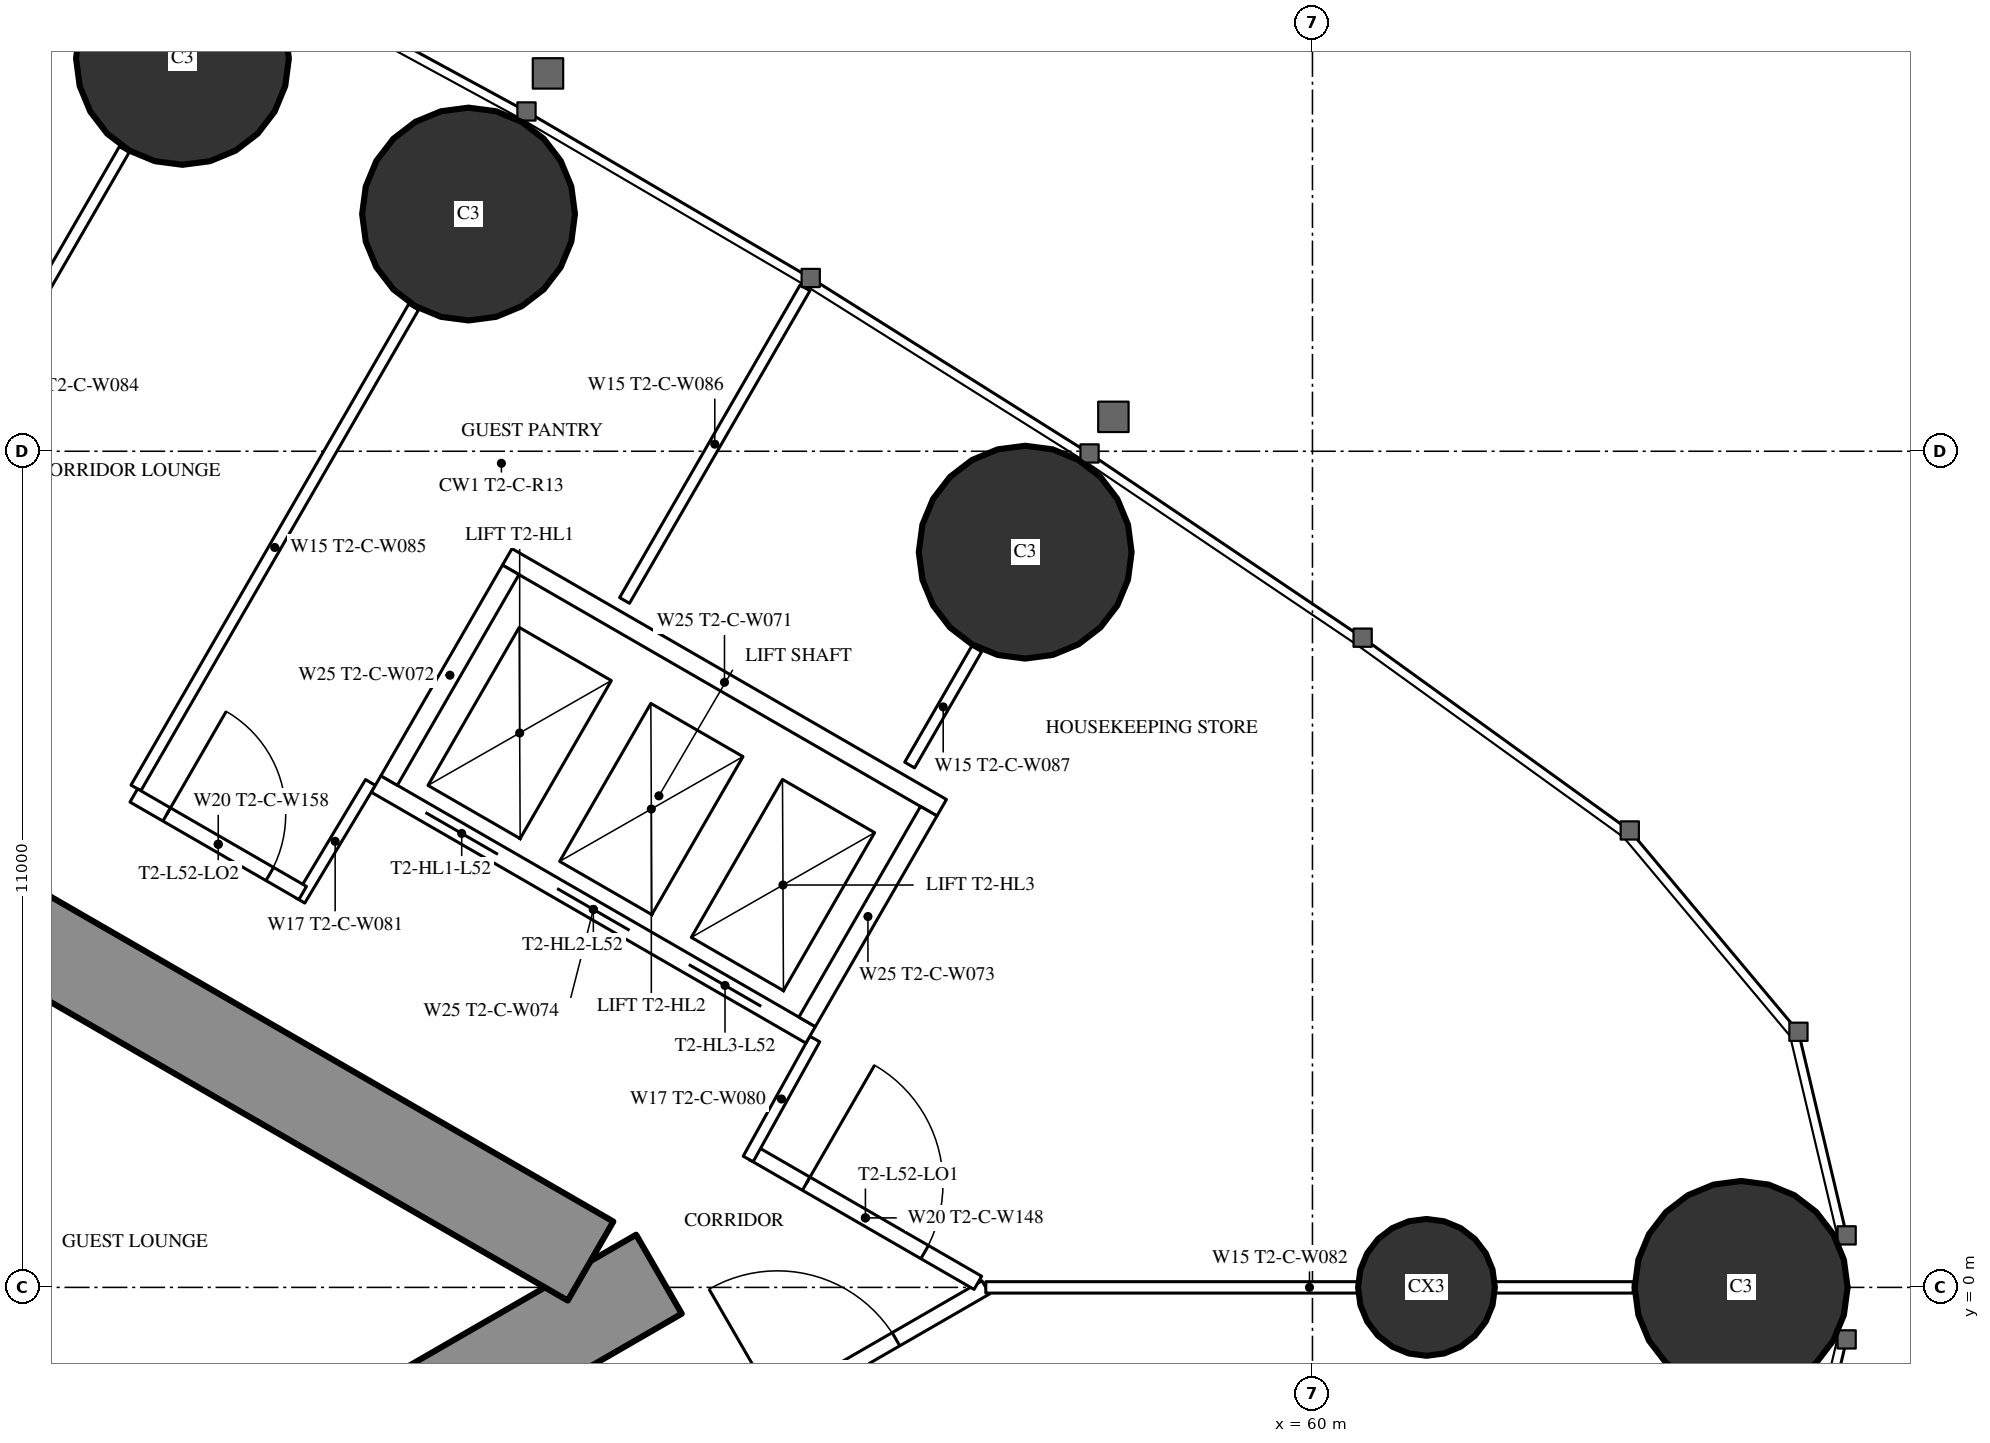
"""IFC4 building model, lengths in metres.
Left out: names, types, materials, properties, quantities, classifications, styles, units other than length and angle.
Written with IfcOpenShell. Run it as: python <this file> out.ifc"""

import sys

from ifc_helpers import new_model, si_unit, direction, frame, frame_2d, origin, origin_2d, place, context, subcontext, project, spatial, rectangle, circle, extrude, element, fill, save


model = new_model("IFC4")
c1 = context("Model", 3, precision=1e-05, world=origin(), true_north=direction((0.0, 1.0)))
c2 = subcontext(c1, "Body", "Model", "MODEL_VIEW")
j1 = project(units=[si_unit("LENGTHUNIT", "METRE"), si_unit("PLANEANGLEUNIT", "RADIAN")], contexts=[c1])
p1 = place(None, origin())
s1 = spatial("IfcSite", under=j1, at=p1, CompositionType="ELEMENT")
p2 = place(p1, origin())
s2 = spatial("IfcBuilding", under=s1, at=p2, CompositionType="ELEMENT")
p3 = place(p2, frame((0.0, 0.0, 194.8)))
s3 = spatial("IfcBuildingStorey", under=s2, at=p3, CompositionType="ELEMENT", Elevation=194.8)
for number, where, z_axis, x_axis in (
    (1, (65.64, 0.0, 0.0), (0.0, 0.0, 1.0), (1.0, 0.0, 0.0)),
    (2, (56.221, 9.672, 0.0), (0.0, 0.0, 1.0), (1.0, 0.0, 0.0)),
    (3, (48.897, 14.121, 0.0), (0.0, 0.0, 1.0), (1.0, 0.0, 0.0)),
    (4, (45.134, 16.168, 0.0), (0.0, 0.0, 1.0), (1.0, 0.0, 0.0)),
):
    element("IfcColumn", number, at=place(p3, frame(where, z_axis=z_axis, x_axis=x_axis)), inside=s3, PredefinedType="COLUMN", context=c2, shape_type="SweptSolid", body=[
        extrude(circle(Radius=1.4, at=origin_2d()), origin(), (0.0, 0.0, 1.0), 3.5),
    ])
p4 = place(p3, frame((61.5, 0.0, 0.0), z_axis=(0.0, 0.0, 1.0), x_axis=(1.0, 0.0, 0.0)))
e5 = element("IfcColumn", 5, at=p4, inside=s3, PredefinedType="COLUMN", context=c2, shape_type="SweptSolid", body=[
    extrude(circle(Radius=0.9, at=origin_2d()), origin(), (0.0, 0.0, 1.0), 3.5),
])
p5 = place(p3, frame((27.2, -13.8, 0.0), z_axis=(0.0, 0.0, 1.0), x_axis=(0.866027159892, 0.499996958321, 0.0)))
e6 = element("IfcWall", 6, at=p5, inside=s3, PredefinedType="SHEAR", context=c2, shape_type="SweptSolid", body=[
    extrude(rectangle(XDim=27.947, YDim=1.2, at=frame_2d((13.973, 0.0))), origin(), (0.0, 0.0, 1.0), 3.5),
])
p6 = place(p5, frame((4.6, 0.0, 0.0)))
e7 = element("IfcOpeningElement", 7, at=p6, cuts=e6, PredefinedType="OPENING", context=c2, shape_type="SweptSolid", body=[
    extrude(rectangle(XDim=1.0, YDim=2.2, at=frame_2d((0.5, 1.1))), frame((0.0, 0.61, 0.0), z_axis=(0.0, -1.0, 0.0), x_axis=(1.0, 0.0, 0.0)), (0.0, 0.0, 1.0), 1.22),
])
p7 = place(p5, frame((13.395, 0.0, 0.0)))
e8 = element("IfcOpeningElement", 8, at=p7, cuts=e6, PredefinedType="OPENING", context=c2, shape_type="SweptSolid", body=[
    extrude(rectangle(XDim=1.8, YDim=2.2, at=frame_2d((0.9, 1.1))), frame((0.0, 0.61, 0.0), z_axis=(0.0, -1.0, 0.0), x_axis=(1.0, 0.0, 0.0)), (0.0, 0.0, 1.0), 1.22),
])
p8 = place(p3, frame((27.2, 13.8, 0.0), z_axis=(0.0, 0.0, 1.0), x_axis=(0.866024515034, -0.500001539357, 0.0)))
e9 = element("IfcWall", 9, at=p8, inside=s3, PredefinedType="SHEAR", context=c2, shape_type="SweptSolid", body=[
    extrude(rectangle(XDim=26.907, YDim=1.2, at=frame_2d((13.454, 0.0))), origin(), (0.0, 0.0, 1.0), 3.5),
])
p9 = place(p8, frame((4.6, 0.0, 0.0)))
e10 = element("IfcOpeningElement", 10, at=p9, cuts=e9, PredefinedType="OPENING", context=c2, shape_type="SweptSolid", body=[
    extrude(rectangle(XDim=1.0, YDim=2.2, at=frame_2d((0.5, 1.1))), frame((0.0, 0.61, 0.0), z_axis=(0.0, -1.0, 0.0), x_axis=(1.0, 0.0, 0.0)), (0.0, 0.0, 1.0), 1.22),
])
p10 = place(p8, frame((13.395, 0.0, 0.0)))
e11 = element("IfcOpeningElement", 11, at=p10, cuts=e9, PredefinedType="OPENING", context=c2, shape_type="SweptSolid", body=[
    extrude(rectangle(XDim=1.8, YDim=2.2, at=frame_2d((0.9, 1.1))), frame((0.0, 0.61, 0.0), z_axis=(0.0, -1.0, 0.0), x_axis=(1.0, 0.0, 0.0)), (0.0, 0.0, 1.0), 1.22),
])
p11 = place(p3, frame((27.959, -16.017, 0.0), z_axis=(0.0, 0.0, 1.0), x_axis=(0.866024151371, 0.500002169237, 0.0)))
e12 = element("IfcWall", 12, at=p11, inside=s3, PredefinedType="PARTITIONING", context=c2, shape_type="SweptSolid", body=[
    extrude(rectangle(XDim=32.034, YDim=0.2, at=frame_2d((16.017, 0.0))), origin(), (0.0, 0.0, 1.0), 3.25),
])
p12 = place(p11, frame((0.6, 0.0, 0.0)))
e13 = element("IfcOpeningElement", 13, at=p12, cuts=e12, PredefinedType="OPENING", context=c2, shape_type="SweptSolid", body=[
    extrude(rectangle(XDim=0.95, YDim=2.2, at=frame_2d((0.475, 1.1))), frame((0.0, 0.11, 0.0), z_axis=(0.0, -1.0, 0.0), x_axis=(1.0, 0.0, 0.0)), (0.0, 0.0, 1.0), 0.22),
])
p13 = place(p11, frame((13.132, 0.0, 0.0)))
e14 = element("IfcOpeningElement", 14, at=p13, cuts=e12, PredefinedType="OPENING", context=c2, shape_type="SweptSolid", body=[
    extrude(rectangle(XDim=0.95, YDim=2.2, at=frame_2d((0.475, 1.1))), frame((0.0, 0.11, 0.0), z_axis=(0.0, -1.0, 0.0), x_axis=(1.0, 0.0, 0.0)), (0.0, 0.0, 1.0), 0.22),
])
p14 = place(p11, frame((15.391, 0.0, 0.0)))
e15 = element("IfcOpeningElement", 15, at=p14, cuts=e12, PredefinedType="OPENING", context=c2, shape_type="SweptSolid", body=[
    extrude(rectangle(XDim=0.95, YDim=2.2, at=frame_2d((0.475, 1.1))), frame((0.0, 0.11, 0.0), z_axis=(0.0, -1.0, 0.0), x_axis=(1.0, 0.0, 0.0)), (0.0, 0.0, 1.0), 0.22),
])
p15 = place(p11, frame((19.441, 0.0, 0.0)))
e16 = element("IfcOpeningElement", 16, at=p15, cuts=e12, PredefinedType="OPENING", context=c2, shape_type="SweptSolid", body=[
    extrude(rectangle(XDim=0.95, YDim=2.2, at=frame_2d((0.475, 1.1))), frame((0.0, 0.11, 0.0), z_axis=(0.0, -1.0, 0.0), x_axis=(1.0, 0.0, 0.0)), (0.0, 0.0, 1.0), 0.22),
])
p16 = place(p11, frame((26.406, 0.0, 0.0)))
e17 = element("IfcOpeningElement", 17, at=p16, cuts=e12, PredefinedType="OPENING", context=c2, shape_type="SweptSolid", body=[
    extrude(rectangle(XDim=0.95, YDim=2.2, at=frame_2d((0.475, 1.1))), frame((0.0, 0.11, 0.0), z_axis=(0.0, -1.0, 0.0), x_axis=(1.0, 0.0, 0.0)), (0.0, 0.0, 1.0), 0.22),
])
p17 = place(p11, frame((28.87, 0.0, 0.0)))
e18 = element("IfcOpeningElement", 18, at=p17, cuts=e12, PredefinedType="OPENING", context=c2, shape_type="SweptSolid", body=[
    extrude(rectangle(XDim=1.8, YDim=2.2, at=frame_2d((0.9, 1.1))), frame((0.0, 0.11, 0.0), z_axis=(0.0, -1.0, 0.0), x_axis=(1.0, 0.0, 0.0)), (0.0, 0.0, 1.0), 0.22),
])
p18 = place(p3, frame((40.769, 8.737, 0.0), z_axis=(0.0, 0.0, 1.0), x_axis=(0.500013115284, 0.866017831539, 0.0)))
e19 = element("IfcWall", 19, at=p18, inside=s3, PredefinedType="PARTITIONING", context=c2, shape_type="SweptSolid", body=[
    extrude(rectangle(XDim=7.198, YDim=0.15, at=frame_2d((3.599, 0.0))), origin(), (0.0, 0.0, 1.0), 2.3),
])
p19 = place(p3, frame((44.521, 6.571, 0.0), z_axis=(0.0, 0.0, 1.0), x_axis=(0.500020376429, 0.866013639128, 0.0)))
e20 = element("IfcWall", 20, at=p19, inside=s3, PredefinedType="PARTITIONING", context=c2, shape_type="SweptSolid", body=[
    extrude(rectangle(XDim=7.306, YDim=0.15, at=frame_2d((3.653, 0.0))), origin(), (0.0, 0.0, 1.0), 2.3),
])
p20 = place(p3, frame((55.702, 0.0, 0.0), z_axis=(0.0, 0.0, 1.0), x_axis=(1.0, 0.0, 0.0)))
e21 = element("IfcWall", 21, at=p20, inside=s3, PredefinedType="PARTITIONING", context=c2, shape_type="SweptSolid", body=[
    extrude(rectangle(XDim=8.518, YDim=0.15, at=frame_2d((4.259, 0.0))), origin(), (0.0, 0.0, 1.0), 2.3),
])
p21 = place(p3, frame((50.95, 9.037, 0.0), z_axis=(0.0, 0.0, 1.0), x_axis=(0.499988022762, 0.866032318735, 0.0)))
e22 = element("IfcWall", 22, at=p21, inside=s3, PredefinedType="PARTITIONING", context=c2, shape_type="SweptSolid", body=[
    extrude(rectangle(XDim=4.748, YDim=0.15, at=frame_2d((2.374, 0.0))), origin(), (0.0, 0.0, 1.0), 3.25),
])
p22 = place(p3, frame((54.7, 6.872, 0.0), z_axis=(0.0, 0.0, 1.0), x_axis=(0.499989690894, 0.866031355668, 0.0)))
e23 = element("IfcWall", 23, at=p22, inside=s3, PredefinedType="PARTITIONING", context=c2, shape_type="SweptSolid", body=[
    extrude(rectangle(XDim=1.766, YDim=0.15, at=frame_2d((0.883, 0.0))), origin(), (0.0, 0.0, 1.0), 3.25),
])
p23 = place(p3, frame((52.639, 1.769, 0.0), z_axis=(0.0, 0.0, 1.0), x_axis=(0.866027340901, -0.4999966448, 0.0)))
e24 = element("IfcWall", 24, at=p23, inside=s3, PredefinedType="PARTITIONING", context=c2, shape_type="SweptSolid", body=[
    extrude(rectangle(XDim=3.417, YDim=0.2, at=frame_2d((1.708, 0.0))), origin(), (0.0, 0.0, 1.0), 3.25),
])
p24 = place(p23, frame((0.809, 0.0, 0.0)))
e25 = element("IfcOpeningElement", 25, at=p24, cuts=e24, PredefinedType="OPENING", context=c2, shape_type="SweptSolid", body=[
    extrude(rectangle(XDim=1.8, YDim=2.2, at=frame_2d((0.9, 1.1))), frame((0.0, 0.11, 0.0), z_axis=(0.0, -1.0, 0.0), x_axis=(1.0, 0.0, 0.0)), (0.0, 0.0, 1.0), 0.22),
])
for number, where, z_axis, x_axis in (
    (26, (52.576, 1.689, 0.0), (0.0, 0.0, 1.0), (0.485, 0.874, 0.0)),
    (27, (47.606, 6.643, 0.0), (0.0, 0.0, 1.0), (-0.514, -0.858, 0.0)),
):
    element("IfcWall", number, at=place(p3, frame(where, z_axis=z_axis, x_axis=x_axis)), inside=s3, PredefinedType="PARTITIONING", context=c2, shape_type="SweptSolid", body=[
        extrude(rectangle(XDim=1.805, YDim=0.15, at=frame_2d((0.902, 0.0))), origin(), (0.0, 0.0, 1.0), 3.25),
    ])
p25 = place(p3, frame((44.493, 6.472, 0.0), z_axis=(0.0, 0.0, 1.0), x_axis=(0.866027140358, -0.499996992154, 0.0)))
e28 = element("IfcWall", 28, at=p25, inside=s3, PredefinedType="PARTITIONING", context=c2, shape_type="SweptSolid", body=[
    extrude(rectangle(XDim=2.566, YDim=0.2, at=frame_2d((1.283, 0.0))), origin(), (0.0, 0.0, 1.0), 3.25),
])
p26 = place(p25, frame((0.5, 0.0, 0.0)))
e29 = element("IfcOpeningElement", 29, at=p26, cuts=e28, PredefinedType="OPENING", context=c2, shape_type="SweptSolid", body=[
    extrude(rectangle(XDim=1.566, YDim=2.2, at=frame_2d((0.783, 1.1))), frame((0.0, 0.11, 0.0), z_axis=(0.0, -1.0, 0.0), x_axis=(1.0, 0.0, 0.0)), (0.0, 0.0, 1.0), 0.22),
])
p27 = place(p3, frame((47.681, 6.622, 0.0), z_axis=(0.0, 0.0, 1.0), x_axis=(0.86603344179, -0.499986077507, 0.0)))
e30 = element("IfcWall", 30, at=p27, inside=s3, PredefinedType="PARTITIONING", context=c2, shape_type="SweptSolid", body=[
    extrude(rectangle(XDim=6.6, YDim=0.25, at=frame_2d((3.3, 0.0))), origin(), (0.0, 0.0, 1.0), 3.25),
])
p28 = place(p27, frame((0.75, 0.0, 0.0)))
e31 = element("IfcOpeningElement", 31, at=p28, cuts=e30, PredefinedType="OPENING", context=c2, shape_type="SweptSolid", body=[
    extrude(rectangle(XDim=1.1, YDim=2.2, at=frame_2d((0.55, 1.1))), frame((0.0, 0.135, 0.0), z_axis=(0.0, -1.0, 0.0), x_axis=(1.0, 0.0, 0.0)), (0.0, 0.0, 1.0), 0.27),
])
p29 = place(p27, frame((2.75, 0.0, 0.0)))
e32 = element("IfcOpeningElement", 32, at=p29, cuts=e30, PredefinedType="OPENING", context=c2, shape_type="SweptSolid", body=[
    extrude(rectangle(XDim=1.1, YDim=2.2, at=frame_2d((0.55, 1.1))), frame((0.0, 0.135, 0.0), z_axis=(0.0, -1.0, 0.0), x_axis=(1.0, 0.0, 0.0)), (0.0, 0.0, 1.0), 0.27),
])
p30 = place(p27, frame((4.75, 0.0, 0.0)))
e33 = element("IfcOpeningElement", 33, at=p30, cuts=e30, PredefinedType="OPENING", context=c2, shape_type="SweptSolid", body=[
    extrude(rectangle(XDim=1.1, YDim=2.2, at=frame_2d((0.55, 1.1))), frame((0.0, 0.135, 0.0), z_axis=(0.0, -1.0, 0.0), x_axis=(1.0, 0.0, 0.0)), (0.0, 0.0, 1.0), 0.27),
])
p31 = place(p3, frame((49.406, 9.611, 0.0), z_axis=(0.0, 0.0, 1.0), x_axis=(0.86603344179, -0.499986077507, 0.0)))
e34 = element("IfcWall", 34, at=p31, inside=s3, PredefinedType="PARTITIONING", context=c2, shape_type="SweptSolid", body=[
    extrude(rectangle(XDim=6.6, YDim=0.25, at=frame_2d((3.3, 0.0))), origin(), (0.0, 0.0, 1.0), 3.25),
])
p32 = place(p3, frame((47.852, 6.668, 0.0), z_axis=(0.0, 0.0, 1.0), x_axis=(0.499929347863, 0.866066190972, 0.0)))
e35 = element("IfcWall", 35, at=p32, inside=s3, PredefinedType="PARTITIONING", context=c2, shape_type="SweptSolid", body=[
    extrude(rectangle(XDim=3.201, YDim=0.25, at=frame_2d((1.6, 0.0))), origin(), (0.0, 0.0, 1.0), 3.25),
])
p33 = place(p3, frame((53.352, 3.493, 0.0), z_axis=(0.0, 0.0, 1.0), x_axis=(0.499872130319, 0.866099216793, 0.0)))
e36 = element("IfcWall", 36, at=p33, inside=s3, PredefinedType="PARTITIONING", context=c2, shape_type="SweptSolid", body=[
    extrude(rectangle(XDim=3.2, YDim=0.25, at=frame_2d((1.6, 0.0))), origin(), (0.0, 0.0, 1.0), 3.25),
])
p34 = place(p17, origin())
e37 = element("IfcDoor", 37, at=p34, inside=s3, OperationType="DOUBLE_DOOR_SINGLE_SWING", PredefinedType="DOOR", context=c2, shape_type="SweptSolid", body=[
    extrude(rectangle(XDim=1.8, YDim=2.2, at=frame_2d((0.9, 1.1))), frame((0.0, 0.025, 0.0), z_axis=(0.0, -1.0, 0.0), x_axis=(1.0, 0.0, 0.0)), (0.0, 0.0, 1.0), 0.05),
])
fill(e18, e37)
p35 = place(p24, origin())
e38 = element("IfcDoor", 38, at=p35, inside=s3, OperationType="DOUBLE_DOOR_SINGLE_SWING", PredefinedType="DOOR", context=c2, shape_type="SweptSolid", body=[
    extrude(rectangle(XDim=1.8, YDim=2.2, at=frame_2d((0.9, 1.1))), frame((0.0, 0.025, 0.0), z_axis=(0.0, -1.0, 0.0), x_axis=(1.0, 0.0, 0.0)), (0.0, 0.0, 1.0), 0.05),
])
fill(e25, e38)
p36 = place(p26, origin())
e39 = element("IfcDoor", 39, at=p36, inside=s3, OperationType="SINGLE_SWING_LEFT", PredefinedType="DOOR", context=c2, shape_type="SweptSolid", body=[
    extrude(rectangle(XDim=1.566, YDim=2.2, at=frame_2d((0.783, 1.1))), frame((0.0, 0.025, 0.0), z_axis=(0.0, -1.0, 0.0), x_axis=(1.0, 0.0, 0.0)), (0.0, 0.0, 1.0), 0.05),
])
fill(e29, e39)
p37 = place(p28, origin())
e40 = element("IfcDoor", 40, at=p37, inside=s3, OperationType="DOUBLE_DOOR_SLIDING", PredefinedType="USERDEFINED", context=c2, shape_type="SweptSolid", body=[
    extrude(rectangle(XDim=1.1, YDim=2.2, at=frame_2d((0.55, 1.1))), frame((0.0, 0.025, 0.0), z_axis=(0.0, -1.0, 0.0), x_axis=(1.0, 0.0, 0.0)), (0.0, 0.0, 1.0), 0.05),
])
fill(e31, e40)
p38 = place(p29, origin())
e41 = element("IfcDoor", 41, at=p38, inside=s3, OperationType="DOUBLE_DOOR_SLIDING", PredefinedType="USERDEFINED", context=c2, shape_type="SweptSolid", body=[
    extrude(rectangle(XDim=1.1, YDim=2.2, at=frame_2d((0.55, 1.1))), frame((0.0, 0.025, 0.0), z_axis=(0.0, -1.0, 0.0), x_axis=(1.0, 0.0, 0.0)), (0.0, 0.0, 1.0), 0.05),
])
fill(e32, e41)
p39 = place(p30, origin())
e42 = element("IfcDoor", 42, at=p39, inside=s3, OperationType="DOUBLE_DOOR_SLIDING", PredefinedType="USERDEFINED", context=c2, shape_type="SweptSolid", body=[
    extrude(rectangle(XDim=1.1, YDim=2.2, at=frame_2d((0.55, 1.1))), frame((0.0, 0.025, 0.0), z_axis=(0.0, -1.0, 0.0), x_axis=(1.0, 0.0, 0.0)), (0.0, 0.0, 1.0), 0.05),
])
fill(e33, e42)
save(model, sys.argv[1])
